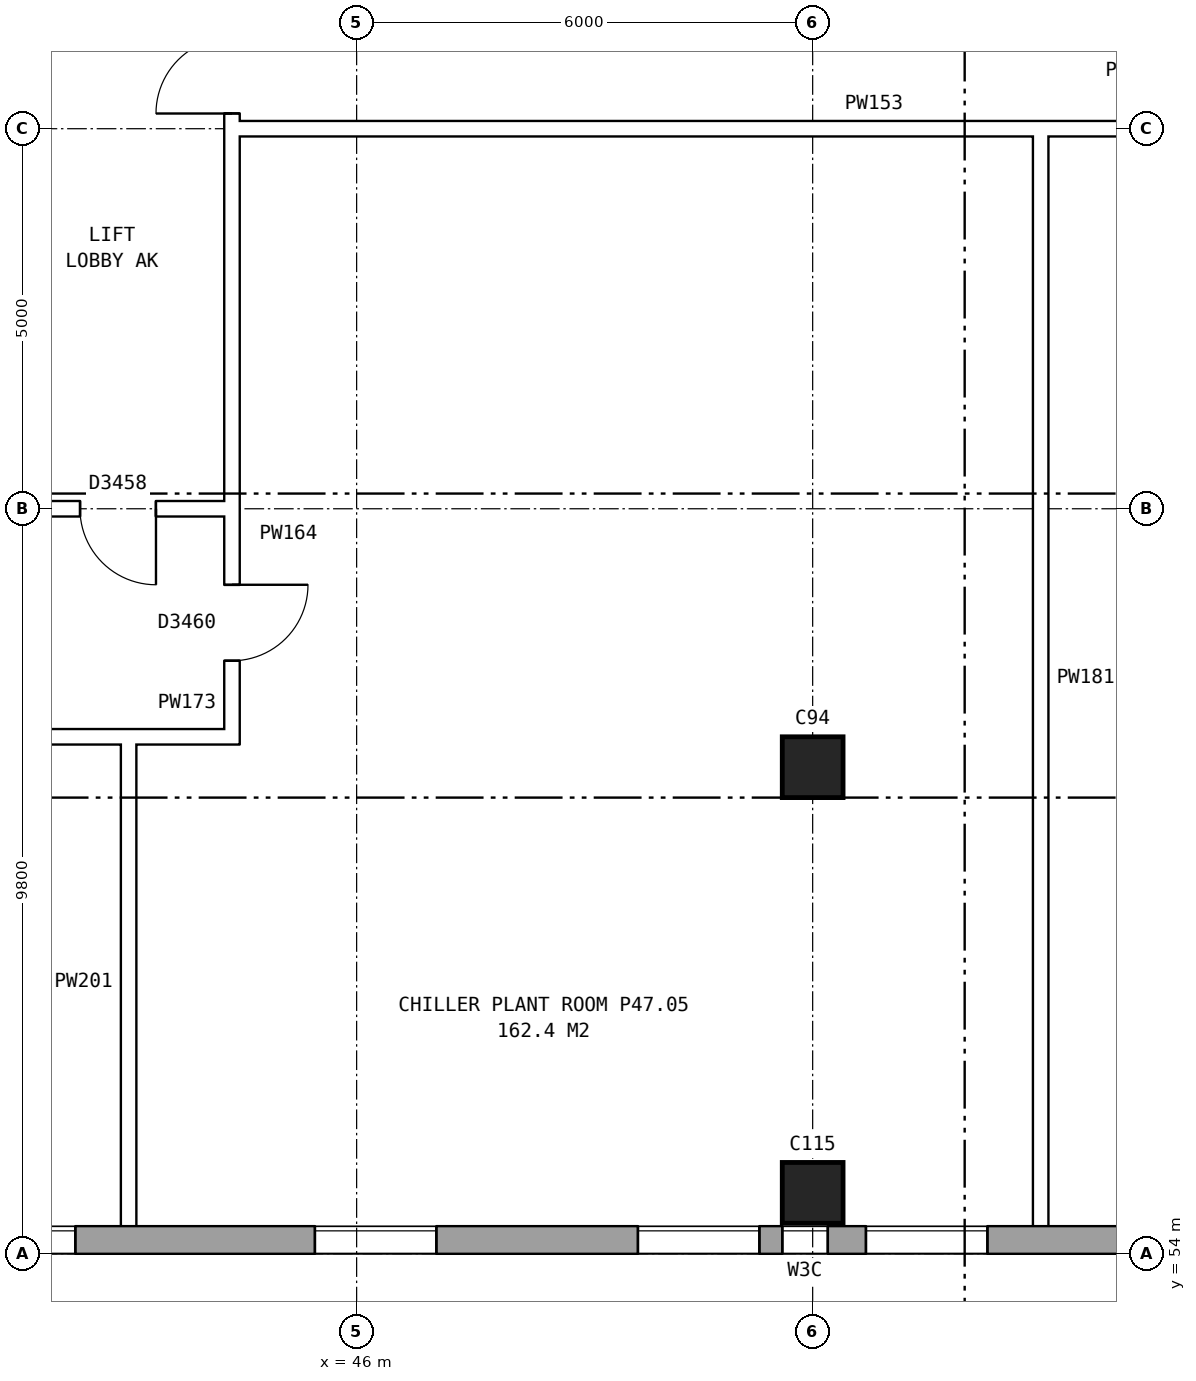
"""IFC4 building model, lengths in metres.
Left out: names, types, materials, properties, quantities, classifications, styles, units other than length and angle.
Written with IfcOpenShell. Run it as: python <this file> out.ifc"""

import sys

from ifc_helpers import new_model, si_unit, direction, frame, frame_2d, origin, origin_2d, place, context, subcontext, project, spatial, rectangle, extrude, element, fill, save


model = new_model("IFC4")
c1 = context("Model", 3, precision=1e-05, world=origin(), true_north=direction((0.0, 1.0)))
c2 = subcontext(c1, "Body", "Model", "MODEL_VIEW")
j1 = project(units=[si_unit("LENGTHUNIT", "METRE"), si_unit("PLANEANGLEUNIT", "RADIAN")], contexts=[c1])
p1 = place(None, origin())
s1 = spatial("IfcSite", under=j1, at=p1, CompositionType="ELEMENT")
p2 = place(p1, origin())
s2 = spatial("IfcBuilding", under=s1, at=p2, CompositionType="ELEMENT")
p3 = place(p2, frame((0.0, 0.0, 167.1)))
s3 = spatial("IfcBuildingStorey", under=s2, at=p3, CompositionType="ELEMENT", Elevation=167.1)
for number, where, z_axis, x_axis in (
    (1, (52.0, 54.8, 0.0), (0.0, 0.0, 1.0), (1.0, 0.0, 0.0)),
    (2, (52.0, 60.4, 0.0), (0.0, 0.0, 1.0), (1.0, 0.0, 0.0)),
):
    element("IfcColumn", number, at=place(p3, frame(where, z_axis=z_axis, x_axis=x_axis)), inside=s3, PredefinedType="COLUMN", context=c2, shape_type="SweptSolid", body=[
        extrude(rectangle(XDim=0.8, YDim=0.8, at=origin_2d()), origin(), (0.0, 0.0, 1.0), 4.2),
    ])
p4 = place(p3, frame((33.325, 54.18, 0.0), z_axis=(0.0, 0.0, 1.0), x_axis=(1.0, 0.0, 0.0)))
e3 = element("IfcWall", 3, at=p4, inside=s3, PredefinedType="STANDARD", context=c2, shape_type="SweptSolid", body=[
    extrude(rectangle(XDim=39.601, YDim=0.36, at=frame_2d((19.8, 0.0))), origin(), (0.0, 0.0, 1.0), 4.2),
])
p5 = place(p4, frame((0.5, 0.0, 1.5)))
e4 = element("IfcOpeningElement", 4, at=p5, cuts=e3, PredefinedType="OPENING", context=c2, shape_type="SweptSolid", body=[
    extrude(rectangle(XDim=1.6, YDim=1.2, at=frame_2d((0.8, 0.6))), frame((0.0, 0.19, 0.0), z_axis=(0.0, -1.0, 0.0), x_axis=(1.0, 0.0, 0.0)), (0.0, 0.0, 1.0), 0.38),
])
p6 = place(p4, frame((5.125, 0.0, 1.5)))
e5 = element("IfcOpeningElement", 5, at=p6, cuts=e3, PredefinedType="OPENING", context=c2, shape_type="SweptSolid", body=[
    extrude(rectangle(XDim=1.6, YDim=1.2, at=frame_2d((0.8, 0.6))), frame((0.0, 0.19, 0.0), z_axis=(0.0, -1.0, 0.0), x_axis=(1.0, 0.0, 0.0)), (0.0, 0.0, 1.0), 0.38),
])
p7 = place(p4, frame((7.375, 0.0, 1.5)))
e6 = element("IfcOpeningElement", 6, at=p7, cuts=e3, PredefinedType="OPENING", context=c2, shape_type="SweptSolid", body=[
    extrude(rectangle(XDim=1.6, YDim=1.2, at=frame_2d((0.8, 0.6))), frame((0.0, 0.19, 0.0), z_axis=(0.0, -1.0, 0.0), x_axis=(1.0, 0.0, 0.0)), (0.0, 0.0, 1.0), 0.38),
])
p8 = place(p4, frame((12.125, 0.0, 1.5)))
e7 = element("IfcOpeningElement", 7, at=p8, cuts=e3, PredefinedType="OPENING", context=c2, shape_type="SweptSolid", body=[
    extrude(rectangle(XDim=1.6, YDim=1.2, at=frame_2d((0.8, 0.6))), frame((0.0, 0.19, 0.0), z_axis=(0.0, -1.0, 0.0), x_axis=(1.0, 0.0, 0.0)), (0.0, 0.0, 1.0), 0.38),
])
p9 = place(p4, frame((18.275, 0.0, 1.5)))
e8 = element("IfcOpeningElement", 8, at=p9, cuts=e3, PredefinedType="OPENING", context=c2, shape_type="SweptSolid", body=[
    extrude(rectangle(XDim=0.6, YDim=1.2, at=frame_2d((0.3, 0.6))), frame((0.0, 0.19, 0.0), z_axis=(0.0, -1.0, 0.0), x_axis=(1.0, 0.0, 0.0)), (0.0, 0.0, 1.0), 0.38),
])
p10 = place(p4, frame((16.375, 0.0, 1.5)))
e9 = element("IfcOpeningElement", 9, at=p10, cuts=e3, PredefinedType="OPENING", context=c2, shape_type="SweptSolid", body=[
    extrude(rectangle(XDim=1.6, YDim=1.2, at=frame_2d((0.8, 0.6))), frame((0.0, 0.19, 0.0), z_axis=(0.0, -1.0, 0.0), x_axis=(1.0, 0.0, 0.0)), (0.0, 0.0, 1.0), 0.38),
])
p11 = place(p4, frame((19.375, 0.0, 1.5)))
e10 = element("IfcOpeningElement", 10, at=p11, cuts=e3, PredefinedType="OPENING", context=c2, shape_type="SweptSolid", body=[
    extrude(rectangle(XDim=1.6, YDim=1.2, at=frame_2d((0.8, 0.6))), frame((0.0, 0.19, 0.0), z_axis=(0.0, -1.0, 0.0), x_axis=(1.0, 0.0, 0.0)), (0.0, 0.0, 1.0), 0.38),
])
p12 = place(p4, frame((23.725, 0.0, 1.5)))
e11 = element("IfcOpeningElement", 11, at=p12, cuts=e3, PredefinedType="OPENING", context=c2, shape_type="SweptSolid", body=[
    extrude(rectangle(XDim=1.6, YDim=1.2, at=frame_2d((0.8, 0.6))), frame((0.0, 0.19, 0.0), z_axis=(0.0, -1.0, 0.0), x_axis=(1.0, 0.0, 0.0)), (0.0, 0.0, 1.0), 0.38),
])
p13 = place(p4, frame((28.375, 0.0, 1.5)))
e12 = element("IfcOpeningElement", 12, at=p13, cuts=e3, PredefinedType="OPENING", context=c2, shape_type="SweptSolid", body=[
    extrude(rectangle(XDim=1.6, YDim=1.2, at=frame_2d((0.8, 0.6))), frame((0.0, 0.19, 0.0), z_axis=(0.0, -1.0, 0.0), x_axis=(1.0, 0.0, 0.0)), (0.0, 0.0, 1.0), 0.38),
])
p14 = place(p4, frame((31.375, 0.0, 1.5)))
e13 = element("IfcOpeningElement", 13, at=p14, cuts=e3, PredefinedType="OPENING", context=c2, shape_type="SweptSolid", body=[
    extrude(rectangle(XDim=1.6, YDim=1.2, at=frame_2d((0.8, 0.6))), frame((0.0, 0.19, 0.0), z_axis=(0.0, -1.0, 0.0), x_axis=(1.0, 0.0, 0.0)), (0.0, 0.0, 1.0), 0.38),
])
p15 = place(p4, frame((35.325, 0.0, 1.5)))
e14 = element("IfcOpeningElement", 14, at=p15, cuts=e3, PredefinedType="OPENING", context=c2, shape_type="SweptSolid", body=[
    extrude(rectangle(XDim=0.9, YDim=1.2, at=frame_2d((0.45, 0.6))), frame((0.0, 0.19, 0.0), z_axis=(0.0, -1.0, 0.0), x_axis=(1.0, 0.0, 0.0)), (0.0, 0.0, 1.0), 0.38),
])
p16 = place(p3, frame((44.36, 63.9, 0.0), z_axis=(0.0, 0.0, 1.0), x_axis=(0.0, 1.0, 0.0)))
e15 = element("IfcWall", 15, at=p16, inside=s3, PredefinedType="PARTITIONING", context=c2, shape_type="SweptSolid", body=[
    extrude(rectangle(XDim=12.2, YDim=0.2, at=frame_2d((6.1, 0.0))), origin(), (0.0, 0.0, 1.0), 4.2),
])
p17 = place(p16, frame((5.1, 0.0, 0.0)))
e16 = element("IfcOpeningElement", 16, at=p17, cuts=e15, PredefinedType="OPENING", context=c2, shape_type="SweptSolid", body=[
    extrude(rectangle(XDim=2.0, YDim=2.1, at=frame_2d((1.0, 1.05))), frame((0.0, 0.11, 0.0), z_axis=(0.0, -1.0, 0.0), x_axis=(1.0, 0.0, 0.0)), (0.0, 0.0, 1.0), 0.22),
])
p18 = place(p3, frame((30.49, 60.8, 0.0), z_axis=(0.0, 0.0, 1.0), x_axis=(1.0, 0.0, 0.0)))
e17 = element("IfcWall", 17, at=p18, inside=s3, PredefinedType="PARTITIONING", context=c2, shape_type="SweptSolid", body=[
    extrude(rectangle(XDim=13.97, YDim=0.2, at=frame_2d((6.985, 0.0))), origin(), (0.0, 0.0, 1.0), 4.2),
])
p19 = place(p18, frame((2.815, 0.0, 0.0)))
e18 = element("IfcOpeningElement", 18, at=p19, cuts=e17, PredefinedType="OPENING", context=c2, shape_type="SweptSolid", body=[
    extrude(rectangle(XDim=1.0, YDim=2.1, at=frame_2d((0.5, 1.05))), frame((0.0, 0.11, 0.0), z_axis=(0.0, -1.0, 0.0), x_axis=(1.0, 0.0, 0.0)), (0.0, 0.0, 1.0), 0.22),
])
p20 = place(p18, frame((10.21, 0.0, 0.0)))
e19 = element("IfcOpeningElement", 19, at=p20, cuts=e17, PredefinedType="OPENING", context=c2, shape_type="SweptSolid", body=[
    extrude(rectangle(XDim=1.0, YDim=2.1, at=frame_2d((0.5, 1.05))), frame((0.0, 0.11, 0.0), z_axis=(0.0, -1.0, 0.0), x_axis=(1.0, 0.0, 0.0)), (0.0, 0.0, 1.0), 0.22),
])
p21 = place(p3, frame((41.36, 63.8, 0.0), z_axis=(0.0, 0.0, 1.0), x_axis=(1.0, 0.0, 0.0)))
e20 = element("IfcWall", 20, at=p21, inside=s3, PredefinedType="PARTITIONING", context=c2, shape_type="SweptSolid", body=[
    extrude(rectangle(XDim=3.1, YDim=0.2, at=frame_2d((1.55, 0.0))), origin(), (0.0, 0.0, 1.0), 4.2),
])
p22 = place(p21, frame((1.0, 0.0, 0.0)))
e21 = element("IfcOpeningElement", 21, at=p22, cuts=e20, PredefinedType="OPENING", context=c2, shape_type="SweptSolid", body=[
    extrude(rectangle(XDim=1.0, YDim=2.1, at=frame_2d((0.5, 1.05))), frame((0.0, 0.11, 0.0), z_axis=(0.0, -1.0, 0.0), x_axis=(1.0, 0.0, 0.0)), (0.0, 0.0, 1.0), 0.22),
])
p23 = place(p3, frame((44.36, 68.8, 0.0), z_axis=(0.0, 0.0, 1.0), x_axis=(1.0, 0.0, 0.0)))
e22 = element("IfcWall", 22, at=p23, inside=s3, PredefinedType="PARTITIONING", context=c2, shape_type="SweptSolid", body=[
    extrude(rectangle(XDim=19.28, YDim=0.2, at=frame_2d((9.64, 0.0))), origin(), (0.0, 0.0, 1.0), 4.2),
])
p24 = place(p3, frame((43.0, 54.24, 0.0), z_axis=(0.0, 0.0, 1.0), x_axis=(0.0, 1.0, 0.0)))
e23 = element("IfcWall", 23, at=p24, inside=s3, PredefinedType="PARTITIONING", context=c2, shape_type="SweptSolid", body=[
    extrude(rectangle(XDim=6.66, YDim=0.2, at=frame_2d((3.33, 0.0))), origin(), (0.0, 0.0, 1.0), 4.2),
])
p25 = place(p3, frame((44.36, 60.7, 0.0), z_axis=(0.0, 0.0, 1.0), x_axis=(0.0, 1.0, 0.0)))
e24 = element("IfcWall", 24, at=p25, inside=s3, PredefinedType="PARTITIONING", context=c2, shape_type="SweptSolid", body=[
    extrude(rectangle(XDim=3.2, YDim=0.2, at=frame_2d((1.6, 0.0))), origin(), (0.0, 0.0, 1.0), 4.2),
])
p26 = place(p25, frame((1.1, 0.0, 0.0)))
e25 = element("IfcOpeningElement", 25, at=p26, cuts=e24, PredefinedType="OPENING", context=c2, shape_type="SweptSolid", body=[
    extrude(rectangle(XDim=1.0, YDim=2.1, at=frame_2d((0.5, 1.05))), frame((0.0, 0.11, 0.0), z_axis=(0.0, -1.0, 0.0), x_axis=(1.0, 0.0, 0.0)), (0.0, 0.0, 1.0), 0.22),
])
p27 = place(p3, frame((55.0, 54.24, 0.0), z_axis=(0.0, 0.0, 1.0), x_axis=(0.0, 1.0, 0.0)))
e26 = element("IfcWall", 26, at=p27, inside=s3, PredefinedType="PARTITIONING", context=c2, shape_type="SweptSolid", body=[
    extrude(rectangle(XDim=14.66, YDim=0.2, at=frame_2d((7.33, 0.0))), origin(), (0.0, 0.0, 1.0), 4.2),
])
p28 = place(p7, origin())
e27 = element("IfcWindow", 27, at=p28, inside=s3, PartitioningType="DOUBLE_PANEL_HORIZONTAL", PredefinedType="WINDOW", context=c2, shape_type="SweptSolid", body=[
    extrude(rectangle(XDim=1.6, YDim=1.2, at=frame_2d((0.8, 0.6))), frame((0.0, 0.15, 0.0), z_axis=(0.0, -1.0, 0.0), x_axis=(1.0, 0.0, 0.0)), (0.0, 0.0, 1.0), 0.06),
])
fill(e6, e27)
p29 = place(p8, origin())
e28 = element("IfcWindow", 28, at=p29, inside=s3, PartitioningType="DOUBLE_PANEL_HORIZONTAL", PredefinedType="WINDOW", context=c2, shape_type="SweptSolid", body=[
    extrude(rectangle(XDim=1.6, YDim=1.2, at=frame_2d((0.8, 0.6))), frame((0.0, 0.15, 0.0), z_axis=(0.0, -1.0, 0.0), x_axis=(1.0, 0.0, 0.0)), (0.0, 0.0, 1.0), 0.06),
])
fill(e7, e28)
p30 = place(p9, origin())
e29 = element("IfcWindow", 29, at=p30, inside=s3, PartitioningType="DOUBLE_PANEL_HORIZONTAL", PredefinedType="WINDOW", context=c2, shape_type="SweptSolid", body=[
    extrude(rectangle(XDim=0.6, YDim=1.2, at=frame_2d((0.3, 0.6))), frame((0.0, 0.15, 0.0), z_axis=(0.0, -1.0, 0.0), x_axis=(1.0, 0.0, 0.0)), (0.0, 0.0, 1.0), 0.06),
])
fill(e8, e29)
p31 = place(p10, origin())
e30 = element("IfcWindow", 30, at=p31, inside=s3, PartitioningType="DOUBLE_PANEL_HORIZONTAL", PredefinedType="WINDOW", context=c2, shape_type="SweptSolid", body=[
    extrude(rectangle(XDim=1.6, YDim=1.2, at=frame_2d((0.8, 0.6))), frame((0.0, 0.15, 0.0), z_axis=(0.0, -1.0, 0.0), x_axis=(1.0, 0.0, 0.0)), (0.0, 0.0, 1.0), 0.06),
])
fill(e9, e30)
p32 = place(p11, origin())
e31 = element("IfcWindow", 31, at=p32, inside=s3, PartitioningType="DOUBLE_PANEL_HORIZONTAL", PredefinedType="WINDOW", context=c2, shape_type="SweptSolid", body=[
    extrude(rectangle(XDim=1.6, YDim=1.2, at=frame_2d((0.8, 0.6))), frame((0.0, 0.15, 0.0), z_axis=(0.0, -1.0, 0.0), x_axis=(1.0, 0.0, 0.0)), (0.0, 0.0, 1.0), 0.06),
])
fill(e10, e31)
p33 = place(p17, origin())
e32 = element("IfcDoor", 32, at=p33, inside=s3, OperationType="DOUBLE_DOOR_SINGLE_SWING", PredefinedType="DOOR", context=c2, shape_type="SweptSolid", body=[
    extrude(rectangle(XDim=2.0, YDim=2.1, at=frame_2d((1.0, 1.05))), frame((0.0, 0.025, 0.0), z_axis=(0.0, -1.0, 0.0), x_axis=(1.0, 0.0, 0.0)), (0.0, 0.0, 1.0), 0.05),
])
fill(e16, e32)
p34 = place(p22, frame((1.0, 0.0, 0.0), z_axis=(0.0, 0.0, 1.0), x_axis=(-1.0, 0.0, 0.0)))
e33 = element("IfcDoor", 33, at=p34, inside=s3, OperationType="SINGLE_SWING_LEFT", PredefinedType="DOOR", context=c2, shape_type="SweptSolid", body=[
    extrude(rectangle(XDim=1.0, YDim=2.1, at=frame_2d((0.5, 1.05))), frame((0.0, 0.025, 0.0), z_axis=(0.0, -1.0, 0.0), x_axis=(1.0, 0.0, 0.0)), (0.0, 0.0, 1.0), 0.05),
])
fill(e21, e33)
p35 = place(p26, frame((1.0, 0.0, 0.0), z_axis=(0.0, 0.0, 1.0), x_axis=(-1.0, 0.0, 0.0)))
e34 = element("IfcDoor", 34, at=p35, inside=s3, OperationType="SINGLE_SWING_LEFT", PredefinedType="DOOR", context=c2, shape_type="SweptSolid", body=[
    extrude(rectangle(XDim=1.0, YDim=2.1, at=frame_2d((0.5, 1.05))), frame((0.0, 0.025, 0.0), z_axis=(0.0, -1.0, 0.0), x_axis=(1.0, 0.0, 0.0)), (0.0, 0.0, 1.0), 0.05),
])
fill(e25, e34)
save(model, sys.argv[1])
